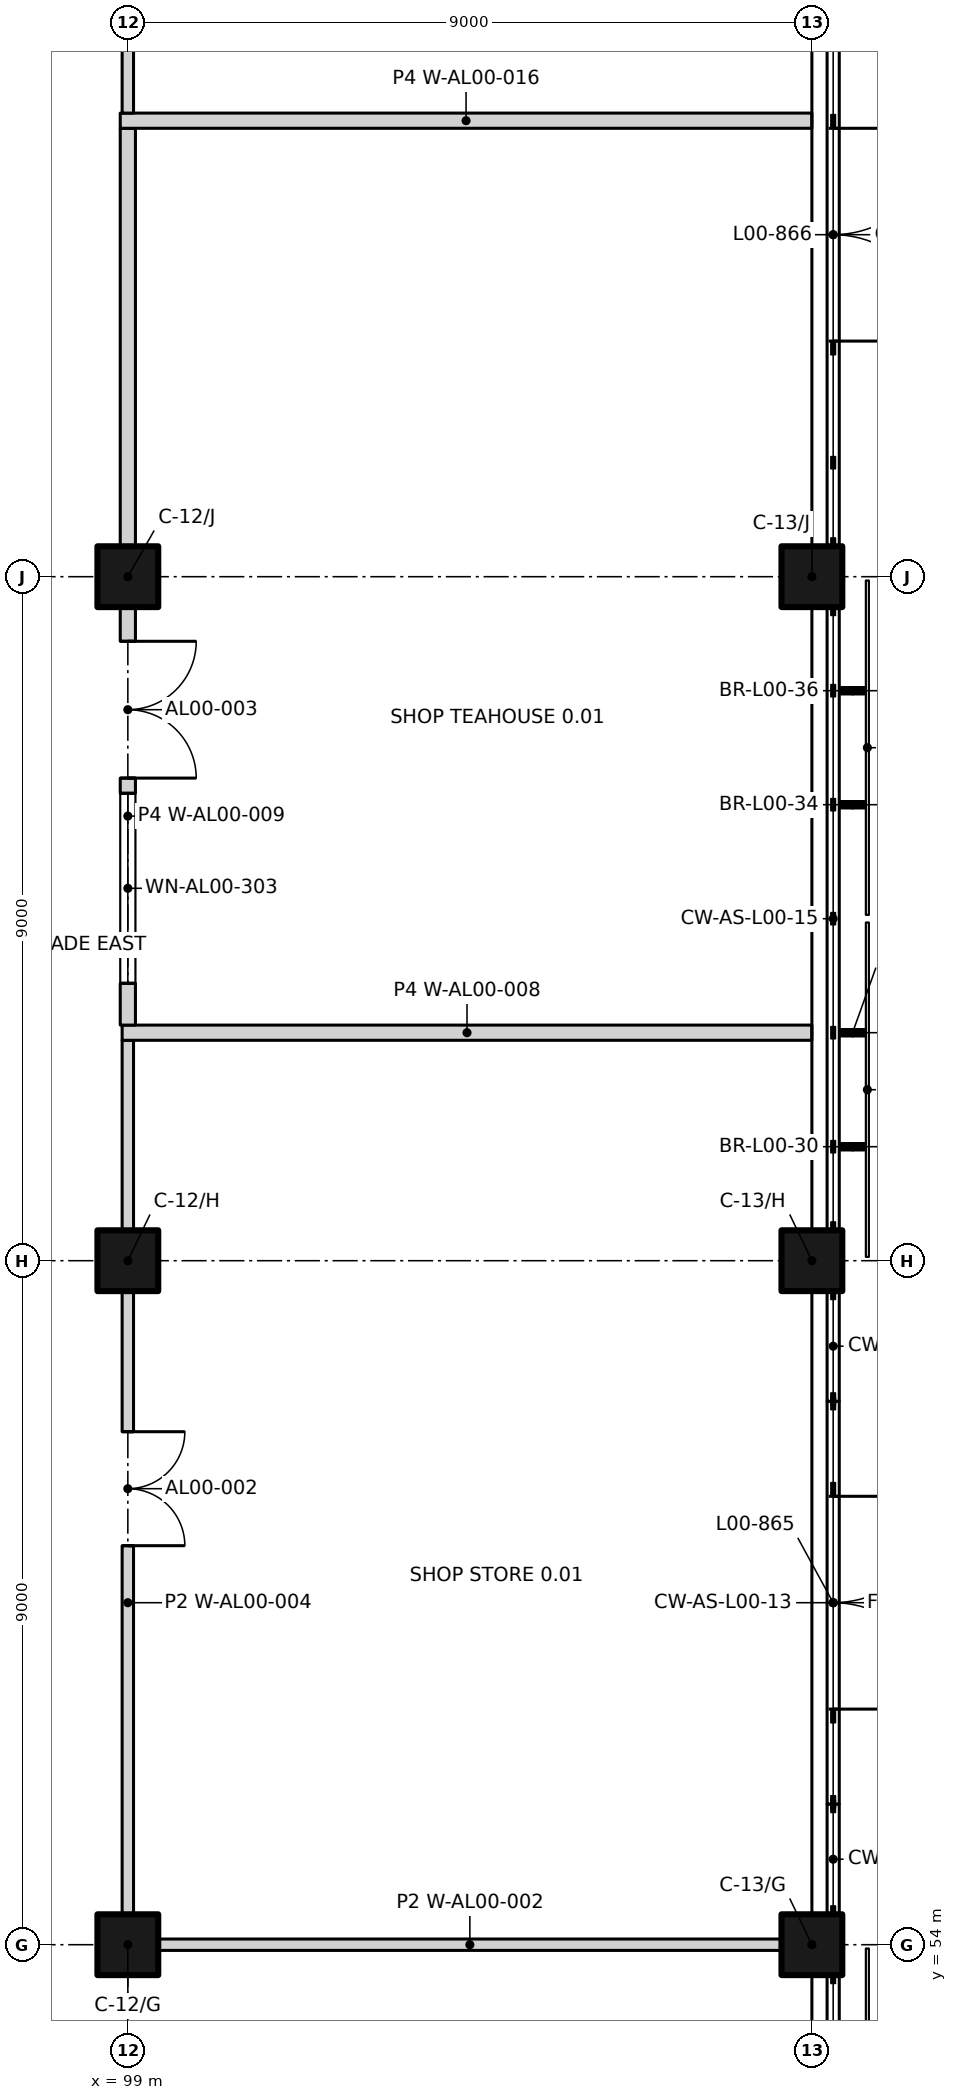
"""IFC4 building model, lengths in metres.
Left out: names, types, materials, properties, quantities, classifications, styles, units other than length and angle.
Written with IfcOpenShell. Run it as: python <this file> out.ifc"""

import sys

from ifc_helpers import new_model, si_unit, direction, frame, frame_2d, origin, origin_2d, place, context, subcontext, project, spatial, rectangle, extrude, element, fill, save


model = new_model("IFC4")
c1 = context("Model", 3, precision=1e-05, world=origin(), true_north=direction((0.0, 1.0)))
c2 = subcontext(c1, "Body", "Model", "MODEL_VIEW")
j1 = project(units=[si_unit("LENGTHUNIT", "METRE"), si_unit("PLANEANGLEUNIT", "RADIAN")], contexts=[c1])
p1 = place(None, origin())
s1 = spatial("IfcSite", under=j1, at=p1, CompositionType="ELEMENT")
p2 = place(p1, origin())
s2 = spatial("IfcBuilding", under=s1, at=p2, CompositionType="ELEMENT")
p3 = place(p2, origin())
s3 = spatial("IfcBuildingStorey", under=s2, at=p3, CompositionType="ELEMENT", Elevation=0.0)
for number, where, z_axis, x_axis in (
    (1, (99.0, 54.0, 0.0), (0.0, 0.0, 1.0), (1.0, 0.0, 0.0)),
    (2, (108.0, 54.0, 0.0), (0.0, 0.0, 1.0), (1.0, 0.0, 0.0)),
    (3, (99.0, 63.0, 0.0), (0.0, 0.0, 1.0), (1.0, 0.0, 0.0)),
    (4, (108.0, 63.0, 0.0), (0.0, 0.0, 1.0), (1.0, 0.0, 0.0)),
    (5, (99.0, 72.0, 0.0), (0.0, 0.0, 1.0), (1.0, 0.0, 0.0)),
    (6, (108.0, 72.0, 0.0), (0.0, 0.0, 1.0), (1.0, 0.0, 0.0)),
):
    element("IfcColumn", number, at=place(p3, frame(where, z_axis=z_axis, x_axis=x_axis)), inside=s3, PredefinedType="COLUMN", context=c2, shape_type="SweptSolid", body=[
        extrude(rectangle(XDim=0.8, YDim=0.8, at=origin_2d()), origin(), (0.0, 0.0, 1.0), 6.0),
    ])
p4 = place(p3, frame((108.28, 59.97, 0.0), z_axis=(0.0, 0.0, 1.0), x_axis=(0.0, -1.0, 0.0)))
e7 = element("IfcWall", 7, at=p4, inside=s3, PredefinedType="STANDARD", context=c2, shape_type="SweptSolid", body=[
    extrude(rectangle(XDim=2.94, YDim=0.12, at=frame_2d((1.47, 0.0))), origin(), (0.0, 0.0, 1.0), 2.97),
])
p5 = place(p4, frame((0.07, 0.0, 0.0)))
e8 = element("IfcOpeningElement", 8, at=p5, cuts=e7, PredefinedType="OPENING", context=c2, shape_type="SweptSolid", body=[
    extrude(rectangle(XDim=2.8, YDim=2.4, at=frame_2d((1.4, 1.2))), frame((0.0, 0.07, 0.0), z_axis=(0.0, -1.0, 0.0), x_axis=(1.0, 0.0, 0.0)), (0.0, 0.0, 1.0), 0.14),
])
p6 = place(p3, frame((108.28, 77.97, 0.0), z_axis=(0.0, 0.0, 1.0), x_axis=(0.0, -1.0, 0.0)))
e9 = element("IfcWall", 9, at=p6, inside=s3, PredefinedType="STANDARD", context=c2, shape_type="SweptSolid", body=[
    extrude(rectangle(XDim=2.94, YDim=0.12, at=frame_2d((1.47, 0.0))), origin(), (0.0, 0.0, 1.0), 2.97),
])
p7 = place(p6, frame((0.07, 0.0, 0.0)))
e10 = element("IfcOpeningElement", 10, at=p7, cuts=e9, PredefinedType="OPENING", context=c2, shape_type="SweptSolid", body=[
    extrude(rectangle(XDim=2.8, YDim=2.4, at=frame_2d((1.4, 1.2))), frame((0.0, 0.07, 0.0), z_axis=(0.0, -1.0, 0.0), x_axis=(1.0, 0.0, 0.0)), (0.0, 0.0, 1.0), 0.14),
])
p8 = place(p3, frame((99.4, 54.0, 0.0), z_axis=(0.0, 0.0, 1.0), x_axis=(1.0, 0.0, 0.0)))
e11 = element("IfcWall", 11, at=p8, inside=s3, PredefinedType="PARTITIONING", context=c2, shape_type="SweptSolid", body=[
    extrude(rectangle(XDim=8.2, YDim=0.15, at=frame_2d((4.1, 0.0))), origin(), (0.0, 0.0, 1.0), 5.65),
])
p9 = place(p3, frame((99.0, 54.4, 0.0), z_axis=(0.0, 0.0, 1.0), x_axis=(0.0, 1.0, 0.0)))
e12 = element("IfcWall", 12, at=p9, inside=s3, PredefinedType="PARTITIONING", context=c2, shape_type="SweptSolid", body=[
    extrude(rectangle(XDim=8.2, YDim=0.15, at=frame_2d((4.1, 0.0))), origin(), (0.0, 0.0, 1.0), 5.2),
])
p10 = place(p9, frame((6.35, 0.0, 0.0), z_axis=(0.0, 0.0, 1.0), x_axis=(-1.0, 0.0, 0.0)))
e13 = element("IfcOpeningElement", 13, at=p10, cuts=e12, PredefinedType="OPENING", context=c2, shape_type="SweptSolid", body=[
    extrude(rectangle(XDim=1.5, YDim=2.1, at=frame_2d((0.75, 1.05))), frame((0.0, 0.085, 0.0), z_axis=(0.0, -1.0, 0.0), x_axis=(1.0, 0.0, 0.0)), (0.0, 0.0, 1.0), 0.17),
])
p11 = place(p3, frame((99.0, 63.4, 0.0), z_axis=(0.0, 0.0, 1.0), x_axis=(0.0, 1.0, 0.0)))
e14 = element("IfcWall", 14, at=p11, inside=s3, PredefinedType="PARTITIONING", context=c2, shape_type="SweptSolid", body=[
    extrude(rectangle(XDim=2.5, YDim=0.15, at=frame_2d((1.25, 0.0))), origin(), (0.0, 0.0, 1.0), 5.2),
])
p12 = place(p3, frame((98.925, 66.0, 0.0), z_axis=(0.0, 0.0, 1.0), x_axis=(1.0, 0.0, 0.0)))
e15 = element("IfcWall", 15, at=p12, inside=s3, PredefinedType="PARTITIONING", context=c2, shape_type="SweptSolid", body=[
    extrude(rectangle(XDim=9.075, YDim=0.2, at=frame_2d((4.538, 0.0))), origin(), (0.0, 0.0, 1.0), 5.2),
])
p13 = place(p3, frame((99.0, 66.1, 0.0), z_axis=(0.0, 0.0, 1.0), x_axis=(0.0, 1.0, 0.0)))
e16 = element("IfcWall", 16, at=p13, inside=s3, PredefinedType="PARTITIONING", context=c2, shape_type="SweptSolid", body=[
    extrude(rectangle(XDim=5.5, YDim=0.2, at=frame_2d((2.75, 0.0))), origin(), (0.0, 0.0, 1.0), 5.2),
])
p14 = place(p13, frame((5.05, 0.0, 0.0), z_axis=(0.0, 0.0, 1.0), x_axis=(-1.0, 0.0, 0.0)))
e17 = element("IfcOpeningElement", 17, at=p14, cuts=e16, PredefinedType="OPENING", context=c2, shape_type="SweptSolid", body=[
    extrude(rectangle(XDim=1.8, YDim=2.1, at=frame_2d((0.9, 1.05))), frame((0.0, 0.11, 0.0), z_axis=(0.0, -1.0, 0.0), x_axis=(1.0, 0.0, 0.0)), (0.0, 0.0, 1.0), 0.22),
])
p15 = place(p13, frame((0.55, 0.0, 0.15)))
e18 = element("IfcOpeningElement", 18, at=p15, cuts=e16, PredefinedType="OPENING", context=c2, shape_type="SweptSolid", body=[
    extrude(rectangle(XDim=2.5, YDim=2.4, at=frame_2d((1.25, 1.2))), frame((0.0, 0.11, 0.0), z_axis=(0.0, -1.0, 0.0), x_axis=(1.0, 0.0, 0.0)), (0.0, 0.0, 1.0), 0.22),
])
p16 = place(p3, frame((99.0, 72.4, 0.0), z_axis=(0.0, 0.0, 1.0), x_axis=(0.0, 1.0, 0.0)))
e19 = element("IfcWall", 19, at=p16, inside=s3, PredefinedType="PARTITIONING", context=c2, shape_type="SweptSolid", body=[
    extrude(rectangle(XDim=5.5, YDim=0.2, at=frame_2d((2.75, 0.0))), origin(), (0.0, 0.0, 1.0), 5.2),
])
p17 = place(p3, frame((98.9, 78.0, 0.0), z_axis=(0.0, 0.0, 1.0), x_axis=(1.0, 0.0, 0.0)))
e20 = element("IfcWall", 20, at=p17, inside=s3, PredefinedType="PARTITIONING", context=c2, shape_type="SweptSolid", body=[
    extrude(rectangle(XDim=9.1, YDim=0.2, at=frame_2d((4.55, 0.0))), origin(), (0.0, 0.0, 1.0), 5.2),
])
p18 = place(p3, frame((99.0, 78.1, 0.0), z_axis=(0.0, 0.0, 1.0), x_axis=(0.0, 1.0, 0.0)))
e21 = element("IfcWall", 21, at=p18, inside=s3, PredefinedType="PARTITIONING", context=c2, shape_type="SweptSolid", body=[
    extrude(rectangle(XDim=2.5, YDim=0.15, at=frame_2d((1.25, 0.0))), origin(), (0.0, 0.0, 1.0), 5.2),
])
p19 = place(p5, origin())
e22 = element("IfcDoor", 22, at=p19, inside=s3, OperationType="DOUBLE_DOOR_SINGLE_SWING", PredefinedType="DOOR", context=c2, shape_type="SweptSolid", body=[
    extrude(rectangle(XDim=2.8, YDim=2.4, at=frame_2d((1.4, 1.2))), frame((0.0, 0.025, 0.0), z_axis=(0.0, -1.0, 0.0), x_axis=(1.0, 0.0, 0.0)), (0.0, 0.0, 1.0), 0.05),
])
fill(e8, e22)
p20 = place(p7, origin())
e23 = element("IfcDoor", 23, at=p20, inside=s3, OperationType="DOUBLE_DOOR_SINGLE_SWING", PredefinedType="DOOR", context=c2, shape_type="SweptSolid", body=[
    extrude(rectangle(XDim=2.8, YDim=2.4, at=frame_2d((1.4, 1.2))), frame((0.0, 0.025, 0.0), z_axis=(0.0, -1.0, 0.0), x_axis=(1.0, 0.0, 0.0)), (0.0, 0.0, 1.0), 0.05),
])
fill(e10, e23)
p21 = place(p10, origin())
e24 = element("IfcDoor", 24, at=p21, inside=s3, OperationType="DOUBLE_DOOR_SINGLE_SWING", PredefinedType="DOOR", context=c2, shape_type="SweptSolid", body=[
    extrude(rectangle(XDim=1.5, YDim=2.1, at=frame_2d((0.75, 1.05))), frame((0.0, 0.025, 0.0), z_axis=(0.0, -1.0, 0.0), x_axis=(1.0, 0.0, 0.0)), (0.0, 0.0, 1.0), 0.05),
])
fill(e13, e24)
p22 = place(p14, origin())
e25 = element("IfcDoor", 25, at=p22, inside=s3, OperationType="DOUBLE_DOOR_SINGLE_SWING", PredefinedType="DOOR", context=c2, shape_type="SweptSolid", body=[
    extrude(rectangle(XDim=1.8, YDim=2.1, at=frame_2d((0.9, 1.05))), frame((0.0, 0.025, 0.0), z_axis=(0.0, -1.0, 0.0), x_axis=(1.0, 0.0, 0.0)), (0.0, 0.0, 1.0), 0.05),
])
fill(e17, e25)
p23 = place(p15, origin())
e26 = element("IfcWindow", 26, at=p23, inside=s3, PartitioningType="SINGLE_PANEL", PredefinedType="WINDOW", context=c2, shape_type="SweptSolid", body=[
    extrude(rectangle(XDim=2.5, YDim=2.4, at=frame_2d((1.25, 1.2))), frame((0.0, 0.03, 0.0), z_axis=(0.0, -1.0, 0.0), x_axis=(1.0, 0.0, 0.0)), (0.0, 0.0, 1.0), 0.06),
])
fill(e18, e26)
save(model, sys.argv[1])
